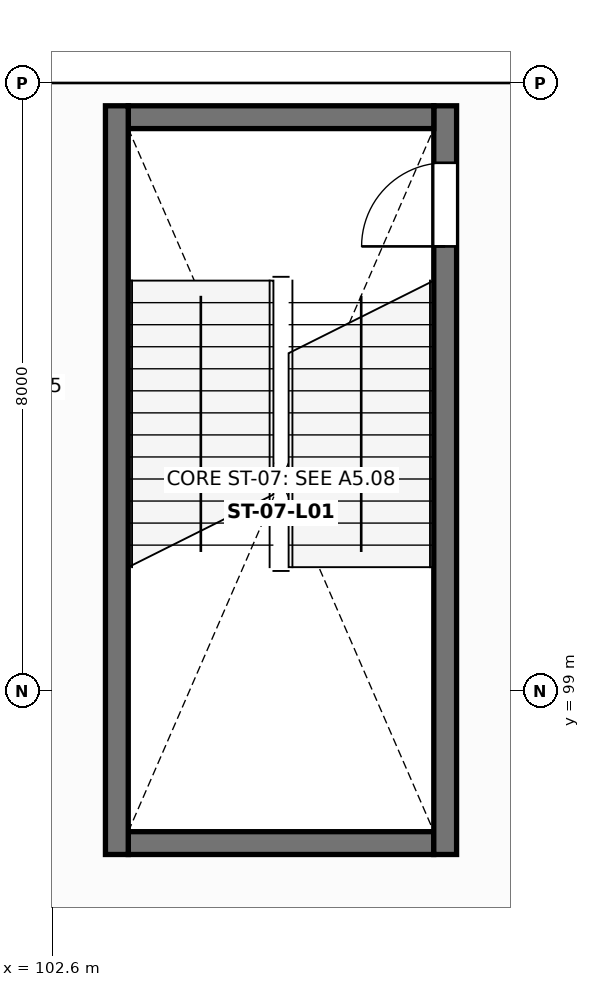
"""IFC4 building model, lengths in metres.
Left out: names, types, materials, properties, quantities, classifications, styles, units other than length and angle.
Written with IfcOpenShell. Run it as: python <this file> out.ifc"""

import sys

from ifc_helpers import new_model, si_unit, direction, frame, frame_2d, origin, place, context, subcontext, project, spatial, rectangle, extrude, element, fill, save


model = new_model("IFC4")
c1 = context("Model", 3, precision=1e-05, world=origin(), true_north=direction((0.0, 1.0)))
c2 = subcontext(c1, "Body", "Model", "MODEL_VIEW")
j1 = project(units=[si_unit("LENGTHUNIT", "METRE"), si_unit("PLANEANGLEUNIT", "RADIAN")], contexts=[c1])
p1 = place(None, origin())
s1 = spatial("IfcSite", under=j1, at=p1, CompositionType="ELEMENT")
p2 = place(p1, origin())
s2 = spatial("IfcBuilding", under=s1, at=p2, CompositionType="ELEMENT")
p3 = place(p2, frame((0.0, 0.0, 6.0)))
s3 = spatial("IfcBuildingStorey", under=s2, at=p3, CompositionType="ELEMENT", Elevation=6.0)
p4 = place(p3, frame((103.6, 97.0, 0.0), z_axis=(0.0, 0.0, 1.0), x_axis=(1.0, 0.0, 0.0)))
e1 = element("IfcWall", 1, at=p4, inside=s3, PredefinedType="SHEAR", context=c2, shape_type="SweptSolid", body=[
    extrude(rectangle(XDim=4.02, YDim=0.3, at=frame_2d((2.01, 0.0))), origin(), (0.0, 0.0, 1.0), 4.945),
])
p5 = place(p3, frame((107.77, 96.85, 0.0), z_axis=(0.0, 0.0, 1.0), x_axis=(0.0, 1.0, 0.0)))
e2 = element("IfcWall", 2, at=p5, inside=s3, PredefinedType="SHEAR", context=c2, shape_type="SweptSolid", body=[
    extrude(rectangle(XDim=9.85, YDim=0.3, at=frame_2d((4.925, 0.0))), origin(), (0.0, 0.0, 1.0), 4.945),
])
p6 = place(p5, frame((8.0, 0.0, 0.0)))
e3 = element("IfcOpeningElement", 3, at=p6, cuts=e2, PredefinedType="OPENING", context=c2, shape_type="SweptSolid", body=[
    extrude(rectangle(XDim=1.1, YDim=2.15, at=frame_2d((0.55, 1.075))), frame((0.0, 0.16, 0.0), z_axis=(0.0, -1.0, 0.0), x_axis=(1.0, 0.0, 0.0)), (0.0, 0.0, 1.0), 0.32),
])
p7 = place(p3, frame((107.62, 106.55, 0.0), z_axis=(0.0, 0.0, 1.0), x_axis=(-1.0, 0.0, 0.0)))
e4 = element("IfcWall", 4, at=p7, inside=s3, PredefinedType="SHEAR", context=c2, shape_type="SweptSolid", body=[
    extrude(rectangle(XDim=4.02, YDim=0.3, at=frame_2d((2.01, 0.0))), origin(), (0.0, 0.0, 1.0), 4.945),
])
p8 = place(p3, frame((103.45, 106.7, 0.0), z_axis=(0.0, 0.0, 1.0), x_axis=(0.0, -1.0, 0.0)))
e5 = element("IfcWall", 5, at=p8, inside=s3, PredefinedType="SHEAR", context=c2, shape_type="SweptSolid", body=[
    extrude(rectangle(XDim=9.85, YDim=0.3, at=frame_2d((4.925, 0.0))), origin(), (0.0, 0.0, 1.0), 4.945),
])
p9 = place(p6, origin())
e6 = element("IfcDoor", 6, at=p9, inside=s3, OperationType="SINGLE_SWING_LEFT", PredefinedType="DOOR", context=c2, shape_type="SweptSolid", body=[
    extrude(rectangle(XDim=1.1, YDim=2.15, at=frame_2d((0.55, 1.075))), frame((0.0, 0.025, 0.0), z_axis=(0.0, -1.0, 0.0), x_axis=(1.0, 0.0, 0.0)), (0.0, 0.0, 1.0), 0.05),
])
fill(e3, e6)
save(model, sys.argv[1])
